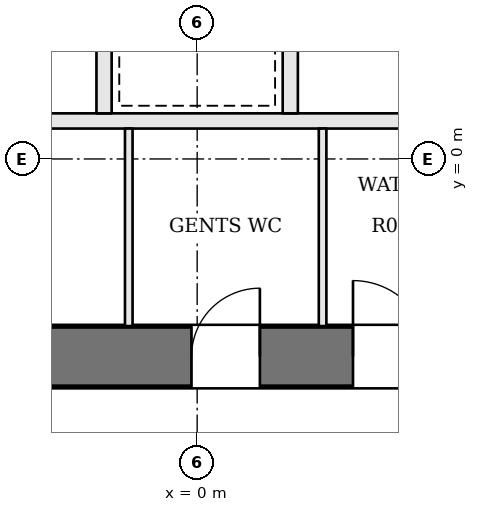
"""IFC4 building model, lengths in metres.
Left out: names, types, materials, properties, quantities, classifications, styles, units other than length and angle.
Written with IfcOpenShell. Run it as: python <this file> out.ifc"""

import sys

from ifc_helpers import new_model, si_unit, direction, frame, frame_2d, origin, place, context, subcontext, project, spatial, rectangle, extrude, element, fill, save


model = new_model("IFC4")
c1 = context("Model", 3, precision=1e-05, world=origin(), true_north=direction((0.0, 1.0)))
c2 = subcontext(c1, "Body", "Model", "MODEL_VIEW")
j1 = project(units=[si_unit("LENGTHUNIT", "METRE"), si_unit("PLANEANGLEUNIT", "RADIAN")], contexts=[c1])
p1 = place(None, origin())
s1 = spatial("IfcSite", under=j1, at=p1, CompositionType="ELEMENT")
p2 = place(p1, origin())
s2 = spatial("IfcBuilding", under=s1, at=p2, CompositionType="ELEMENT")
p3 = place(p2, frame((0.0, 0.0, 260.4)))
s3 = spatial("IfcBuildingStorey", under=s2, at=p3, CompositionType="ELEMENT", Elevation=260.4)
p4 = place(p3, frame((-13.0, -2.6, 0.0), z_axis=(0.0, 0.0, 1.0), x_axis=(1.0, 0.0, 0.0)))
e1 = element("IfcWall", 1, at=p4, inside=s3, PredefinedType="SHEAR", context=c2, shape_type="SweptSolid", body=[
    extrude(rectangle(XDim=26.0, YDim=0.8, at=frame_2d((13.0, 0.0))), origin(), (0.0, 0.0, 1.0), 3.9),
])
p5 = place(p4, frame((9.65, 0.0, 0.0)))
e2 = element("IfcOpeningElement", 2, at=p5, cuts=e1, PredefinedType="OPENING", context=c2, shape_type="SweptSolid", body=[
    extrude(rectangle(XDim=0.9, YDim=2.1, at=frame_2d((0.45, 1.05))), frame((0.0, 0.41, 0.0), z_axis=(0.0, -1.0, 0.0), x_axis=(1.0, 0.0, 0.0)), (0.0, 0.0, 1.0), 0.82),
])
p6 = place(p4, frame((12.925, 0.0, 0.0)))
e3 = element("IfcOpeningElement", 3, at=p6, cuts=e1, PredefinedType="OPENING", context=c2, shape_type="SweptSolid", body=[
    extrude(rectangle(XDim=0.9, YDim=2.1, at=frame_2d((0.45, 1.05))), frame((0.0, 0.41, 0.0), z_axis=(0.0, -1.0, 0.0), x_axis=(1.0, 0.0, 0.0)), (0.0, 0.0, 1.0), 0.82),
])
p7 = place(p4, frame((15.05, 0.0, 0.0)))
e4 = element("IfcOpeningElement", 4, at=p7, cuts=e1, PredefinedType="OPENING", context=c2, shape_type="SweptSolid", body=[
    extrude(rectangle(XDim=1.0, YDim=2.1, at=frame_2d((0.5, 1.05))), frame((0.0, 0.41, 0.0), z_axis=(0.0, -1.0, 0.0), x_axis=(1.0, 0.0, 0.0)), (0.0, 0.0, 1.0), 0.82),
])
p8 = place(p4, frame((16.825, 0.0, 0.0)))
e5 = element("IfcOpeningElement", 5, at=p8, cuts=e1, PredefinedType="OPENING", context=c2, shape_type="SweptSolid", body=[
    extrude(rectangle(XDim=0.7, YDim=2.1, at=frame_2d((0.35, 1.05))), frame((0.0, 0.41, 0.0), z_axis=(0.0, -1.0, 0.0), x_axis=(1.0, 0.0, 0.0)), (0.0, 0.0, 1.0), 0.82),
])
p9 = place(p3, frame((-4.9, 0.5, 0.0), z_axis=(0.0, 0.0, 1.0), x_axis=(1.0, 0.0, 0.0)))
e6 = element("IfcWall", 6, at=p9, inside=s3, PredefinedType="SOLIDWALL", context=c2, shape_type="SweptSolid", body=[
    extrude(rectangle(XDim=9.8, YDim=0.2, at=frame_2d((4.9, 0.0))), origin(), (0.0, 0.0, 1.0), 3.6),
])
for number, where, z_axis, x_axis in (
    (7, (-1.225, 0.6, 0.0), (0.0, 0.0, 1.0), (0.0, 1.0, 0.0)),
    (8, (1.225, 0.6, 0.0), (0.0, 0.0, 1.0), (0.0, 1.0, 0.0)),
):
    element("IfcWall", number, at=place(p3, frame(where, z_axis=z_axis, x_axis=x_axis)), inside=s3, PredefinedType="SOLIDWALL", context=c2, shape_type="SweptSolid", body=[
        extrude(rectangle(XDim=2.2, YDim=0.2, at=frame_2d((1.1, 0.0))), origin(), (0.0, 0.0, 1.0), 3.6),
    ])
for number, where, z_axis, x_axis in (
    (9, (-0.9, -2.2, 0.0), (0.0, 0.0, 1.0), (0.0, 1.0, 0.0)),
    (10, (1.65, -2.2, 0.0), (0.0, 0.0, 1.0), (0.0, 1.0, 0.0)),
):
    element("IfcWall", number, at=place(p3, frame(where, z_axis=z_axis, x_axis=x_axis)), inside=s3, PredefinedType="PARTITIONING", context=c2, shape_type="SweptSolid", body=[
        extrude(rectangle(XDim=2.6, YDim=0.1, at=frame_2d((1.3, 0.0))), origin(), (0.0, 0.0, 1.0), 3.6),
    ])
p10 = place(p6, origin())
e11 = element("IfcDoor", 11, at=p10, inside=s3, OperationType="SINGLE_SWING_RIGHT", PredefinedType="DOOR", context=c2, shape_type="SweptSolid", body=[
    extrude(rectangle(XDim=0.9, YDim=2.1, at=frame_2d((0.45, 1.05))), frame((0.0, 0.025, 0.0), z_axis=(0.0, -1.0, 0.0), x_axis=(1.0, 0.0, 0.0)), (0.0, 0.0, 1.0), 0.05),
])
fill(e3, e11)
p11 = place(p7, origin())
e12 = element("IfcDoor", 12, at=p11, inside=s3, OperationType="SINGLE_SWING_LEFT", PredefinedType="DOOR", context=c2, shape_type="SweptSolid", body=[
    extrude(rectangle(XDim=1.0, YDim=2.1, at=frame_2d((0.5, 1.05))), frame((0.0, 0.025, 0.0), z_axis=(0.0, -1.0, 0.0), x_axis=(1.0, 0.0, 0.0)), (0.0, 0.0, 1.0), 0.05),
])
fill(e4, e12)
save(model, sys.argv[1])
